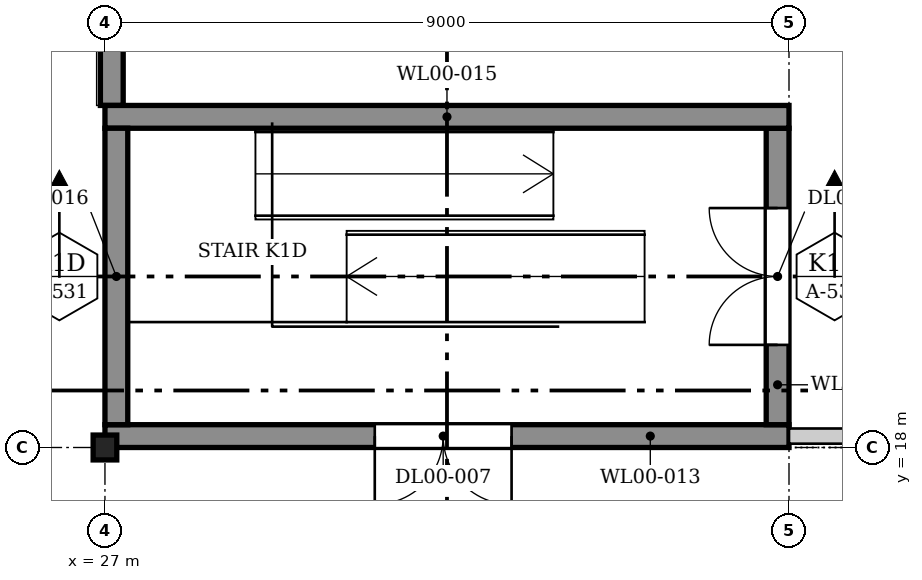
"""IFC4 building model, lengths in metres.
Left out: names, types, materials, properties, quantities, classifications, styles, units other than length and angle.
Written with IfcOpenShell. Run it as: python <this file> out.ifc"""

import sys

from ifc_helpers import new_model, si_unit, direction, frame, frame_2d, origin, origin_2d, place, context, subcontext, project, spatial, rectangle, i_section, extrude, element, fill, save


model = new_model("IFC4")
c1 = context("Model", 3, precision=1e-05, world=origin(), true_north=direction((0.0, 1.0)))
c2 = subcontext(c1, "Body", "Model", "MODEL_VIEW")
j1 = project(units=[si_unit("LENGTHUNIT", "METRE"), si_unit("PLANEANGLEUNIT", "RADIAN")], contexts=[c1])
p1 = place(None, origin())
s1 = spatial("IfcSite", under=j1, at=p1, CompositionType="ELEMENT")
p2 = place(p1, origin())
s2 = spatial("IfcBuilding", under=s1, at=p2, CompositionType="ELEMENT")
p3 = place(p2, origin())
s3 = spatial("IfcBuildingStorey", under=s2, at=p3, CompositionType="ELEMENT", Elevation=0.0)
p4 = place(p3, frame((27.0, 18.0, 0.0), z_axis=(0.0, 0.0, 1.0), x_axis=(1.0, 0.0, 0.0)))
e1 = element("IfcColumn", 1, at=p4, inside=s3, PredefinedType="COLUMN", context=c2, shape_type="SweptSolid", body=[
    extrude(i_section(OverallWidth=0.311, OverallDepth=0.327, WebThickness=0.016, FlangeThickness=0.025, FilletRadius=0.017, at=origin_2d()), origin(), (0.0, 0.0, 1.0), 5.0),
])
p5 = place(p3, frame((27.09, 22.5, 0.0), z_axis=(0.0, 0.0, 1.0), x_axis=(0.0, 1.0, 0.0)))
e2 = element("IfcWall", 2, at=p5, inside=s3, PredefinedType="SOLIDWALL", context=c2, shape_type="SweptSolid", body=[
    extrude(rectangle(XDim=4.35, YDim=0.3, at=frame_2d((2.175, 0.0))), origin(), (0.0, 0.0, 1.0), 4.378),
])
p6 = place(p3, frame((27.0, 18.15, 0.0), z_axis=(0.0, 0.0, 1.0), x_axis=(1.0, 0.0, 0.0)))
e3 = element("IfcWall", 3, at=p6, inside=s3, PredefinedType="SOLIDWALL", context=c2, shape_type="SweptSolid", body=[
    extrude(rectangle(XDim=9.0, YDim=0.3, at=frame_2d((4.5, 0.0))), origin(), (0.0, 0.0, 1.0), 5.0),
])
p7 = place(p6, frame((3.55, 0.0, 0.0)))
e4 = element("IfcOpeningElement", 4, at=p7, cuts=e3, PredefinedType="OPENING", context=c2, shape_type="SweptSolid", body=[
    extrude(rectangle(XDim=1.8, YDim=2.1, at=frame_2d((0.9, 1.05))), frame((0.0, 0.16, 0.0), z_axis=(0.0, -1.0, 0.0), x_axis=(1.0, 0.0, 0.0)), (0.0, 0.0, 1.0), 0.32),
])
p8 = place(p3, frame((35.85, 18.3, 0.0), z_axis=(0.0, 0.0, 1.0), x_axis=(0.0, 1.0, 0.0)))
e5 = element("IfcWall", 5, at=p8, inside=s3, PredefinedType="SOLIDWALL", context=c2, shape_type="SweptSolid", body=[
    extrude(rectangle(XDim=3.9, YDim=0.3, at=frame_2d((1.95, 0.0))), origin(), (0.0, 0.0, 1.0), 5.0),
])
p9 = place(p8, frame((1.05, 0.0, 0.0)))
e6 = element("IfcOpeningElement", 6, at=p9, cuts=e5, PredefinedType="OPENING", context=c2, shape_type="SweptSolid", body=[
    extrude(rectangle(XDim=1.8, YDim=2.1, at=frame_2d((0.9, 1.05))), frame((0.0, 0.16, 0.0), z_axis=(0.0, -1.0, 0.0), x_axis=(1.0, 0.0, 0.0)), (0.0, 0.0, 1.0), 0.32),
])
p10 = place(p3, frame((27.0, 22.35, 0.0), z_axis=(0.0, 0.0, 1.0), x_axis=(1.0, 0.0, 0.0)))
e7 = element("IfcWall", 7, at=p10, inside=s3, PredefinedType="SOLIDWALL", context=c2, shape_type="SweptSolid", body=[
    extrude(rectangle(XDim=9.0, YDim=0.3, at=frame_2d((4.5, 0.0))), origin(), (0.0, 0.0, 1.0), 5.0),
])
p11 = place(p3, frame((27.15, 18.3, 0.0), z_axis=(0.0, 0.0, 1.0), x_axis=(0.0, 1.0, 0.0)))
e8 = element("IfcWall", 8, at=p11, inside=s3, PredefinedType="SOLIDWALL", context=c2, shape_type="SweptSolid", body=[
    extrude(rectangle(XDim=3.9, YDim=0.3, at=frame_2d((1.95, 0.0))), origin(), (0.0, 0.0, 1.0), 5.0),
])
p12 = place(p7, frame((1.8, 0.0, 0.0), z_axis=(0.0, 0.0, 1.0), x_axis=(-1.0, 0.0, 0.0)))
e9 = element("IfcDoor", 9, at=p12, inside=s3, OperationType="DOUBLE_DOOR_SINGLE_SWING", PredefinedType="DOOR", context=c2, shape_type="SweptSolid", body=[
    extrude(rectangle(XDim=1.8, YDim=2.1, at=frame_2d((0.9, 1.05))), frame((0.0, 0.025, 0.0), z_axis=(0.0, -1.0, 0.0), x_axis=(1.0, 0.0, 0.0)), (0.0, 0.0, 1.0), 0.05),
])
fill(e4, e9)
p13 = place(p9, origin())
e10 = element("IfcDoor", 10, at=p13, inside=s3, OperationType="DOUBLE_DOOR_SINGLE_SWING", PredefinedType="DOOR", context=c2, shape_type="SweptSolid", body=[
    extrude(rectangle(XDim=1.8, YDim=2.1, at=frame_2d((0.9, 1.05))), frame((0.0, 0.025, 0.0), z_axis=(0.0, -1.0, 0.0), x_axis=(1.0, 0.0, 0.0)), (0.0, 0.0, 1.0), 0.05),
])
fill(e6, e10)
save(model, sys.argv[1])
